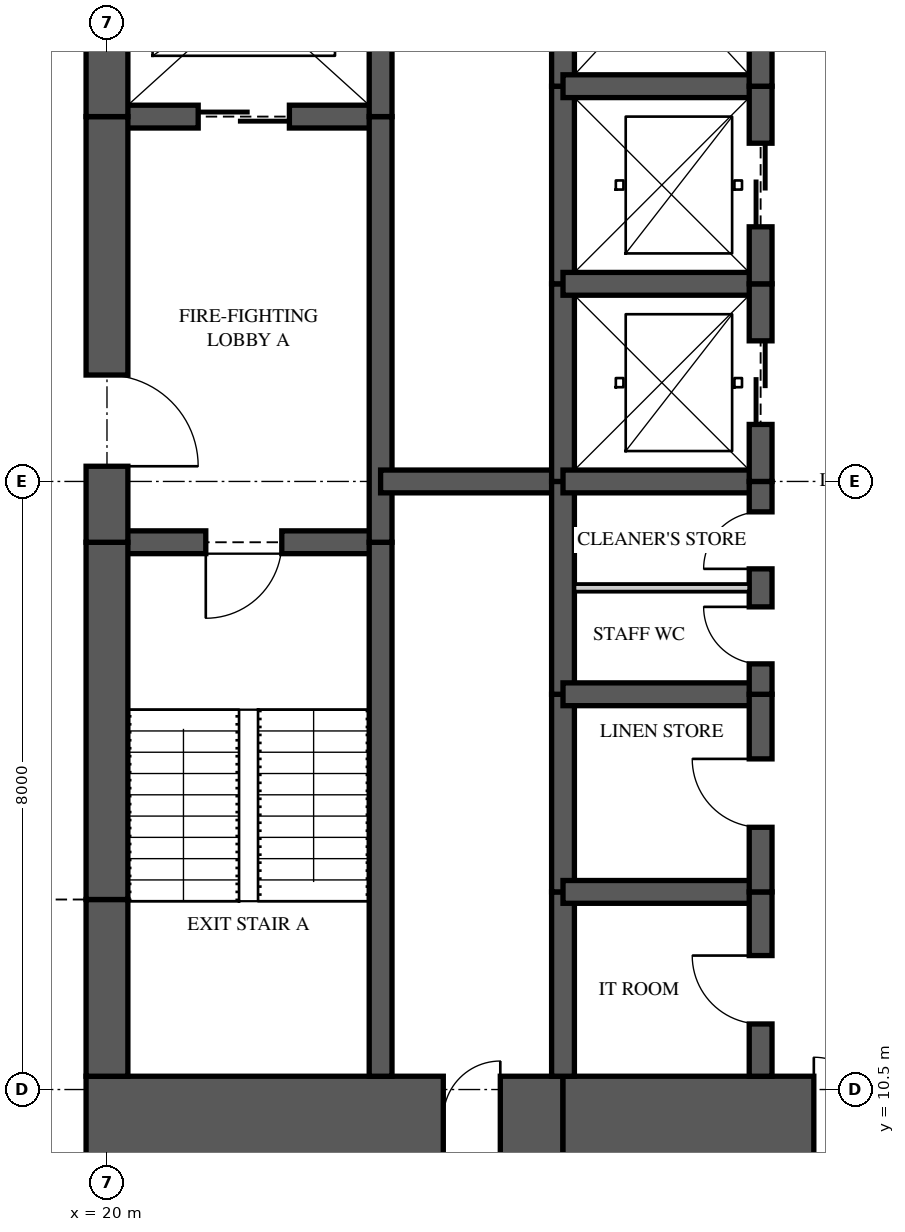
"""IFC4 building model, lengths in metres.
Left out: names, types, materials, properties, quantities, classifications, styles, units other than length and angle.
Written with IfcOpenShell. Run it as: python <this file> out.ifc"""

import sys

from ifc_helpers import new_model, si_unit, direction, frame, frame_2d, origin, place, context, subcontext, project, spatial, rectangle, extrude, element, fill, save


model = new_model("IFC4")
c1 = context("Model", 3, precision=1e-05, world=origin(), true_north=direction((0.0, 1.0)))
c2 = subcontext(c1, "Body", "Model", "MODEL_VIEW")
j1 = project(units=[si_unit("LENGTHUNIT", "METRE"), si_unit("PLANEANGLEUNIT", "RADIAN")], contexts=[c1])
p1 = place(None, origin())
s1 = spatial("IfcSite", under=j1, at=p1, CompositionType="ELEMENT")
p2 = place(p1, origin())
s2 = spatial("IfcBuilding", under=s1, at=p2, CompositionType="ELEMENT")
p3 = place(p2, frame((0.0, 0.0, 231.95)))
s3 = spatial("IfcBuildingStorey", under=s2, at=p3, CompositionType="ELEMENT", Elevation=231.95)
p4 = place(p3, frame((19.725, 10.125, 0.0), z_axis=(0.0, 0.0, 1.0), x_axis=(1.0, 0.0, 0.0)))
e1 = element("IfcWall", 1, at=p4, inside=s3, PredefinedType="SHEAR", context=c2, shape_type="SweptSolid", body=[
    extrude(rectangle(XDim=6.275, YDim=1.1, at=frame_2d((3.137, 0.0))), origin(), (0.0, 0.0, 1.0), 3.5),
])
p5 = place(p4, frame((4.7, 0.0, 0.0)))
e2 = element("IfcOpeningElement", 2, at=p5, cuts=e1, PredefinedType="OPENING", context=c2, shape_type="SweptSolid", body=[
    extrude(rectangle(XDim=0.75, YDim=2.1, at=frame_2d((0.375, 1.05))), frame((0.0, 0.56, 0.0), z_axis=(0.0, -1.0, 0.0), x_axis=(1.0, 0.0, 0.0)), (0.0, 0.0, 1.0), 1.12),
])
p6 = place(p3, frame((26.0, 10.125, 0.0), z_axis=(0.0, 0.0, 1.0), x_axis=(1.0, 0.0, 0.0)))
e3 = element("IfcWall", 3, at=p6, inside=s3, PredefinedType="SHEAR", context=c2, shape_type="SweptSolid", body=[
    extrude(rectangle(XDim=5.6, YDim=1.1, at=frame_2d((2.8, 0.0))), origin(), (0.0, 0.0, 1.0), 3.5),
])
p7 = place(p6, frame((3.3, 0.0, 0.0)))
e4 = element("IfcOpeningElement", 4, at=p7, cuts=e3, PredefinedType="OPENING", context=c2, shape_type="SweptSolid", body=[
    extrude(rectangle(XDim=1.6, YDim=2.1, at=frame_2d((0.8, 1.05))), frame((0.0, 0.56, 0.0), z_axis=(0.0, -1.0, 0.0), x_axis=(1.0, 0.0, 0.0)), (0.0, 0.0, 1.0), 1.12),
])
p8 = place(p3, frame((20.0, 26.325, 0.0), z_axis=(0.0, 0.0, 1.0), x_axis=(0.0, -1.0, 0.0)))
e5 = element("IfcWall", 5, at=p8, inside=s3, PredefinedType="SHEAR", context=c2, shape_type="SweptSolid", body=[
    extrude(rectangle(XDim=3.025, YDim=0.55, at=frame_2d((1.512, 0.0))), origin(), (0.0, 0.0, 1.0), 3.5),
])
p9 = place(p3, frame((20.0, 23.3, 0.0), z_axis=(0.0, 0.0, 1.0), x_axis=(0.0, -1.0, 0.0)))
e6 = element("IfcWall", 6, at=p9, inside=s3, PredefinedType="SHEAR", context=c2, shape_type="SweptSolid", body=[
    extrude(rectangle(XDim=5.6, YDim=0.55, at=frame_2d((2.8, 0.0))), origin(), (0.0, 0.0, 1.0), 3.5),
])
p10 = place(p9, frame((3.4, 0.0, 0.0)))
e7 = element("IfcOpeningElement", 7, at=p10, cuts=e6, PredefinedType="OPENING", context=c2, shape_type="SweptSolid", body=[
    extrude(rectangle(XDim=1.2, YDim=2.2, at=frame_2d((0.6, 1.1))), frame((0.0, 0.285, 0.0), z_axis=(0.0, -1.0, 0.0), x_axis=(1.0, 0.0, 0.0)), (0.0, 0.0, 1.0), 0.57),
])
p11 = place(p3, frame((20.0, 17.7, 0.0), z_axis=(0.0, 0.0, 1.0), x_axis=(0.0, -1.0, 0.0)))
e8 = element("IfcWall", 8, at=p11, inside=s3, PredefinedType="SHEAR", context=c2, shape_type="SweptSolid", body=[
    extrude(rectangle(XDim=4.7, YDim=0.55, at=frame_2d((2.35, 0.0))), origin(), (0.0, 0.0, 1.0), 3.5),
])
p12 = place(p3, frame((20.0, 13.0, 0.0), z_axis=(0.0, 0.0, 1.0), x_axis=(0.0, -1.0, 0.0)))
e9 = element("IfcWall", 9, at=p12, inside=s3, PredefinedType="SHEAR", context=c2, shape_type="SweptSolid", body=[
    extrude(rectangle(XDim=2.325, YDim=0.55, at=frame_2d((1.163, 0.0))), origin(), (0.0, 0.0, 1.0), 3.5),
])
p13 = place(p3, frame((23.6, 10.675, 0.0), z_axis=(0.0, 0.0, 1.0), x_axis=(0.0, 1.0, 0.0)))
e10 = element("IfcWall", 10, at=p13, inside=s3, PredefinedType="SHEAR", context=c2, shape_type="SweptSolid", body=[
    extrude(rectangle(XDim=7.025, YDim=0.3, at=frame_2d((3.512, 0.0))), origin(), (0.0, 0.0, 1.0), 3.5),
])
p14 = place(p3, frame((23.6, 17.7, 0.0), z_axis=(0.0, 0.0, 1.0), x_axis=(0.0, 1.0, 0.0)))
e11 = element("IfcWall", 11, at=p14, inside=s3, PredefinedType="SHEAR", context=c2, shape_type="SweptSolid", body=[
    extrude(rectangle(XDim=5.6, YDim=0.3, at=frame_2d((2.8, 0.0))), origin(), (0.0, 0.0, 1.0), 3.5),
])
p15 = place(p3, frame((23.6, 23.3, 0.0), z_axis=(0.0, 0.0, 1.0), x_axis=(0.0, 1.0, 0.0)))
e12 = element("IfcWall", 12, at=p15, inside=s3, PredefinedType="SHEAR", context=c2, shape_type="SweptSolid", body=[
    extrude(rectangle(XDim=3.025, YDim=0.3, at=frame_2d((1.512, 0.0))), origin(), (0.0, 0.0, 1.0), 3.5),
])
p16 = place(p3, frame((26.0, 10.675, 0.0), z_axis=(0.0, 0.0, 1.0), x_axis=(0.0, 1.0, 0.0)))
e13 = element("IfcWall", 13, at=p16, inside=s3, PredefinedType="SHEAR", context=c2, shape_type="SweptSolid", body=[
    extrude(rectangle(XDim=2.425, YDim=0.3, at=frame_2d((1.212, 0.0))), origin(), (0.0, 0.0, 1.0), 3.5),
])
p17 = place(p3, frame((26.0, 13.1, 0.0), z_axis=(0.0, 0.0, 1.0), x_axis=(0.0, 1.0, 0.0)))
e14 = element("IfcWall", 14, at=p17, inside=s3, PredefinedType="SHEAR", context=c2, shape_type="SweptSolid", body=[
    extrude(rectangle(XDim=2.6, YDim=0.3, at=frame_2d((1.3, 0.0))), origin(), (0.0, 0.0, 1.0), 3.5),
])
p18 = place(p3, frame((26.0, 15.7, 0.0), z_axis=(0.0, 0.0, 1.0), x_axis=(0.0, 1.0, 0.0)))
e15 = element("IfcWall", 15, at=p18, inside=s3, PredefinedType="SHEAR", context=c2, shape_type="SweptSolid", body=[
    extrude(rectangle(XDim=2.8, YDim=0.3, at=frame_2d((1.4, 0.0))), origin(), (0.0, 0.0, 1.0), 3.5),
])
p19 = place(p3, frame((26.0, 18.5, 0.0), z_axis=(0.0, 0.0, 1.0), x_axis=(0.0, 1.0, 0.0)))
e16 = element("IfcWall", 16, at=p19, inside=s3, PredefinedType="SHEAR", context=c2, shape_type="SweptSolid", body=[
    extrude(rectangle(XDim=2.6, YDim=0.3, at=frame_2d((1.3, 0.0))), origin(), (0.0, 0.0, 1.0), 3.5),
])
p20 = place(p3, frame((26.0, 21.1, 0.0), z_axis=(0.0, 0.0, 1.0), x_axis=(0.0, 1.0, 0.0)))
e17 = element("IfcWall", 17, at=p20, inside=s3, PredefinedType="SHEAR", context=c2, shape_type="SweptSolid", body=[
    extrude(rectangle(XDim=2.6, YDim=0.3, at=frame_2d((1.3, 0.0))), origin(), (0.0, 0.0, 1.0), 3.5),
])
p21 = place(p3, frame((26.0, 23.7, 0.0), z_axis=(0.0, 0.0, 1.0), x_axis=(0.0, 1.0, 0.0)))
e18 = element("IfcWall", 18, at=p21, inside=s3, PredefinedType="SHEAR", context=c2, shape_type="SweptSolid", body=[
    extrude(rectangle(XDim=2.625, YDim=0.3, at=frame_2d((1.312, 0.0))), origin(), (0.0, 0.0, 1.0), 3.5),
])
p22 = place(p3, frame((28.6, 10.675, 0.0), z_axis=(0.0, 0.0, 1.0), x_axis=(0.0, 1.0, 0.0)))
e19 = element("IfcWall", 19, at=p22, inside=s3, PredefinedType="SHEAR", context=c2, shape_type="SweptSolid", body=[
    extrude(rectangle(XDim=2.425, YDim=0.3, at=frame_2d((1.212, 0.0))), origin(), (0.0, 0.0, 1.0), 3.5),
])
p23 = place(p22, frame((0.688, 0.0, 0.0)))
e20 = element("IfcOpeningElement", 20, at=p23, cuts=e19, PredefinedType="OPENING", context=c2, shape_type="SweptSolid", body=[
    extrude(rectangle(XDim=0.9, YDim=2.1, at=frame_2d((0.45, 1.05))), frame((0.0, 0.16, 0.0), z_axis=(0.0, -1.0, 0.0), x_axis=(1.0, 0.0, 0.0)), (0.0, 0.0, 1.0), 0.32),
])
p24 = place(p3, frame((28.6, 13.1, 0.0), z_axis=(0.0, 0.0, 1.0), x_axis=(0.0, 1.0, 0.0)))
e21 = element("IfcWall", 21, at=p24, inside=s3, PredefinedType="SHEAR", context=c2, shape_type="SweptSolid", body=[
    extrude(rectangle(XDim=2.6, YDim=0.3, at=frame_2d((1.3, 0.0))), origin(), (0.0, 0.0, 1.0), 3.5),
])
p25 = place(p24, frame((0.85, 0.0, 0.0)))
e22 = element("IfcOpeningElement", 22, at=p25, cuts=e21, PredefinedType="OPENING", context=c2, shape_type="SweptSolid", body=[
    extrude(rectangle(XDim=0.9, YDim=2.1, at=frame_2d((0.45, 1.05))), frame((0.0, 0.16, 0.0), z_axis=(0.0, -1.0, 0.0), x_axis=(1.0, 0.0, 0.0)), (0.0, 0.0, 1.0), 0.32),
])
p26 = place(p3, frame((28.6, 15.7, 0.0), z_axis=(0.0, 0.0, 1.0), x_axis=(0.0, 1.0, 0.0)))
e23 = element("IfcWall", 23, at=p26, inside=s3, PredefinedType="SHEAR", context=c2, shape_type="SweptSolid", body=[
    extrude(rectangle(XDim=2.8, YDim=0.3, at=frame_2d((1.4, 0.0))), origin(), (0.0, 0.0, 1.0), 3.5),
])
p27 = place(p26, frame((0.4, 0.0, 0.0)))
e24 = element("IfcOpeningElement", 24, at=p27, cuts=e23, PredefinedType="OPENING", context=c2, shape_type="SweptSolid", body=[
    extrude(rectangle(XDim=0.75, YDim=2.1, at=frame_2d((0.375, 1.05))), frame((0.0, 0.16, 0.0), z_axis=(0.0, -1.0, 0.0), x_axis=(1.0, 0.0, 0.0)), (0.0, 0.0, 1.0), 0.32),
])
p28 = place(p26, frame((1.65, 0.0, 0.0)))
e25 = element("IfcOpeningElement", 25, at=p28, cuts=e23, PredefinedType="OPENING", context=c2, shape_type="SweptSolid", body=[
    extrude(rectangle(XDim=0.75, YDim=2.1, at=frame_2d((0.375, 1.05))), frame((0.0, 0.16, 0.0), z_axis=(0.0, -1.0, 0.0), x_axis=(1.0, 0.0, 0.0)), (0.0, 0.0, 1.0), 0.32),
])
p29 = place(p3, frame((28.6, 18.5, 0.0), z_axis=(0.0, 0.0, 1.0), x_axis=(0.0, 1.0, 0.0)))
e26 = element("IfcWall", 26, at=p29, inside=s3, PredefinedType="SHEAR", context=c2, shape_type="SweptSolid", body=[
    extrude(rectangle(XDim=2.6, YDim=0.3, at=frame_2d((1.3, 0.0))), origin(), (0.0, 0.0, 1.0), 3.5),
])
p30 = place(p29, frame((0.75, 0.0, 0.0)))
e27 = element("IfcOpeningElement", 27, at=p30, cuts=e26, PredefinedType="OPENING", context=c2, shape_type="SweptSolid", body=[
    extrude(rectangle(XDim=1.1, YDim=2.1, at=frame_2d((0.55, 1.05))), frame((0.0, 0.16, 0.0), z_axis=(0.0, -1.0, 0.0), x_axis=(1.0, 0.0, 0.0)), (0.0, 0.0, 1.0), 0.32),
])
p31 = place(p3, frame((28.6, 21.1, 0.0), z_axis=(0.0, 0.0, 1.0), x_axis=(0.0, 1.0, 0.0)))
e28 = element("IfcWall", 28, at=p31, inside=s3, PredefinedType="SHEAR", context=c2, shape_type="SweptSolid", body=[
    extrude(rectangle(XDim=2.6, YDim=0.3, at=frame_2d((1.3, 0.0))), origin(), (0.0, 0.0, 1.0), 3.5),
])
p32 = place(p31, frame((0.75, 0.0, 0.0)))
e29 = element("IfcOpeningElement", 29, at=p32, cuts=e28, PredefinedType="OPENING", context=c2, shape_type="SweptSolid", body=[
    extrude(rectangle(XDim=1.1, YDim=2.1, at=frame_2d((0.55, 1.05))), frame((0.0, 0.16, 0.0), z_axis=(0.0, -1.0, 0.0), x_axis=(1.0, 0.0, 0.0)), (0.0, 0.0, 1.0), 0.32),
])
p33 = place(p3, frame((28.6, 23.7, 0.0), z_axis=(0.0, 0.0, 1.0), x_axis=(0.0, 1.0, 0.0)))
e30 = element("IfcWall", 30, at=p33, inside=s3, PredefinedType="SHEAR", context=c2, shape_type="SweptSolid", body=[
    extrude(rectangle(XDim=2.625, YDim=0.3, at=frame_2d((1.312, 0.0))), origin(), (0.0, 0.0, 1.0), 3.5),
])
p34 = place(p33, frame((0.85, 0.0, 0.0)))
e31 = element("IfcOpeningElement", 31, at=p34, cuts=e30, PredefinedType="OPENING", context=c2, shape_type="SweptSolid", body=[
    extrude(rectangle(XDim=1.1, YDim=2.1, at=frame_2d((0.55, 1.05))), frame((0.0, 0.16, 0.0), z_axis=(0.0, -1.0, 0.0), x_axis=(1.0, 0.0, 0.0)), (0.0, 0.0, 1.0), 0.32),
])
p35 = place(p3, frame((20.0, 17.7, 0.0), z_axis=(0.0, 0.0, 1.0), x_axis=(1.0, 0.0, 0.0)))
e32 = element("IfcWall", 32, at=p35, inside=s3, PredefinedType="SHEAR", context=c2, shape_type="SweptSolid", body=[
    extrude(rectangle(XDim=3.6, YDim=0.3, at=frame_2d((1.8, 0.0))), origin(), (0.0, 0.0, 1.0), 3.5),
])
p36 = place(p35, frame((1.3, 0.0, 0.0)))
e33 = element("IfcOpeningElement", 33, at=p36, cuts=e32, PredefinedType="OPENING", context=c2, shape_type="SweptSolid", body=[
    extrude(rectangle(XDim=1.0, YDim=2.1, at=frame_2d((0.5, 1.05))), frame((0.0, 0.16, 0.0), z_axis=(0.0, -1.0, 0.0), x_axis=(1.0, 0.0, 0.0)), (0.0, 0.0, 1.0), 0.32),
])
p37 = place(p3, frame((20.0, 23.3, 0.0), z_axis=(0.0, 0.0, 1.0), x_axis=(1.0, 0.0, 0.0)))
e34 = element("IfcWall", 34, at=p37, inside=s3, PredefinedType="SHEAR", context=c2, shape_type="SweptSolid", body=[
    extrude(rectangle(XDim=3.6, YDim=0.3, at=frame_2d((1.8, 0.0))), origin(), (0.0, 0.0, 1.0), 3.5),
])
p38 = place(p37, frame((1.2, 0.0, 0.0)))
e35 = element("IfcOpeningElement", 35, at=p38, cuts=e34, PredefinedType="OPENING", context=c2, shape_type="SweptSolid", body=[
    extrude(rectangle(XDim=1.2, YDim=2.1, at=frame_2d((0.6, 1.05))), frame((0.0, 0.16, 0.0), z_axis=(0.0, -1.0, 0.0), x_axis=(1.0, 0.0, 0.0)), (0.0, 0.0, 1.0), 0.32),
])
p39 = place(p3, frame((23.6, 18.5, 0.0), z_axis=(0.0, 0.0, 1.0), x_axis=(1.0, 0.0, 0.0)))
e36 = element("IfcWall", 36, at=p39, inside=s3, PredefinedType="SHEAR", context=c2, shape_type="SweptSolid", body=[
    extrude(rectangle(XDim=2.4, YDim=0.3, at=frame_2d((1.2, 0.0))), origin(), (0.0, 0.0, 1.0), 3.5),
])
for number, where, z_axis, x_axis in (
    (37, (26.0, 13.1, 0.0), (0.0, 0.0, 1.0), (1.0, 0.0, 0.0)),
    (38, (26.0, 15.7, 0.0), (0.0, 0.0, 1.0), (1.0, 0.0, 0.0)),
    (39, (26.0, 18.5, 0.0), (0.0, 0.0, 1.0), (1.0, 0.0, 0.0)),
    (40, (26.0, 21.1, 0.0), (0.0, 0.0, 1.0), (1.0, 0.0, 0.0)),
    (41, (26.0, 23.7, 0.0), (0.0, 0.0, 1.0), (1.0, 0.0, 0.0)),
):
    element("IfcWall", number, at=place(p3, frame(where, z_axis=z_axis, x_axis=x_axis)), inside=s3, PredefinedType="SHEAR", context=c2, shape_type="SweptSolid", body=[
        extrude(rectangle(XDim=2.6, YDim=0.3, at=frame_2d((1.3, 0.0))), origin(), (0.0, 0.0, 1.0), 3.5),
    ])
p40 = place(p3, frame((26.15, 17.1, 0.0), z_axis=(0.0, 0.0, 1.0), x_axis=(1.0, 0.0, 0.0)))
e42 = element("IfcWall", 42, at=p40, inside=s3, PredefinedType="PARTITIONING", context=c2, shape_type="SweptSolid", body=[
    extrude(rectangle(XDim=2.3, YDim=0.1, at=frame_2d((1.15, 0.0))), origin(), (0.0, 0.0, 1.0), 3.26),
])
p41 = place(p36, frame((1.0, 0.0, 0.0), z_axis=(0.0, 0.0, 1.0), x_axis=(-1.0, 0.0, 0.0)))
e43 = element("IfcDoor", 43, at=p41, inside=s3, OperationType="SINGLE_SWING_RIGHT", PredefinedType="DOOR", context=c2, shape_type="SweptSolid", body=[
    extrude(rectangle(XDim=1.0, YDim=2.1, at=frame_2d((0.5, 1.05))), frame((0.0, 0.025, 0.0), z_axis=(0.0, -1.0, 0.0), x_axis=(1.0, 0.0, 0.0)), (0.0, 0.0, 1.0), 0.05),
])
fill(e33, e43)
p42 = place(p10, origin())
e44 = element("IfcDoor", 44, at=p42, inside=s3, OperationType="SINGLE_SWING_RIGHT", PredefinedType="DOOR", context=c2, shape_type="SweptSolid", body=[
    extrude(rectangle(XDim=1.2, YDim=2.2, at=frame_2d((0.6, 1.1))), frame((0.0, 0.025, 0.0), z_axis=(0.0, -1.0, 0.0), x_axis=(1.0, 0.0, 0.0)), (0.0, 0.0, 1.0), 0.05),
])
fill(e7, e44)
p43 = place(p38, origin())
e45 = element("IfcDoor", 45, at=p43, inside=s3, OperationType="SLIDING_TO_LEFT", PredefinedType="DOOR", context=c2, shape_type="SweptSolid", body=[
    extrude(rectangle(XDim=1.2, YDim=2.1, at=frame_2d((0.6, 1.05))), frame((0.0, 0.025, 0.0), z_axis=(0.0, -1.0, 0.0), x_axis=(1.0, 0.0, 0.0)), (0.0, 0.0, 1.0), 0.05),
])
fill(e35, e45)
p44 = place(p30, origin())
e46 = element("IfcDoor", 46, at=p44, inside=s3, OperationType="SLIDING_TO_LEFT", PredefinedType="DOOR", context=c2, shape_type="SweptSolid", body=[
    extrude(rectangle(XDim=1.1, YDim=2.1, at=frame_2d((0.55, 1.05))), frame((0.0, 0.025, 0.0), z_axis=(0.0, -1.0, 0.0), x_axis=(1.0, 0.0, 0.0)), (0.0, 0.0, 1.0), 0.05),
])
fill(e27, e46)
p45 = place(p32, origin())
e47 = element("IfcDoor", 47, at=p45, inside=s3, OperationType="SLIDING_TO_LEFT", PredefinedType="DOOR", context=c2, shape_type="SweptSolid", body=[
    extrude(rectangle(XDim=1.1, YDim=2.1, at=frame_2d((0.55, 1.05))), frame((0.0, 0.025, 0.0), z_axis=(0.0, -1.0, 0.0), x_axis=(1.0, 0.0, 0.0)), (0.0, 0.0, 1.0), 0.05),
])
fill(e29, e47)
p46 = place(p23, origin())
e48 = element("IfcDoor", 48, at=p46, inside=s3, OperationType="SINGLE_SWING_RIGHT", PredefinedType="DOOR", context=c2, shape_type="SweptSolid", body=[
    extrude(rectangle(XDim=0.9, YDim=2.1, at=frame_2d((0.45, 1.05))), frame((0.0, 0.025, 0.0), z_axis=(0.0, -1.0, 0.0), x_axis=(1.0, 0.0, 0.0)), (0.0, 0.0, 1.0), 0.05),
])
fill(e20, e48)
p47 = place(p25, origin())
e49 = element("IfcDoor", 49, at=p47, inside=s3, OperationType="SINGLE_SWING_RIGHT", PredefinedType="DOOR", context=c2, shape_type="SweptSolid", body=[
    extrude(rectangle(XDim=0.9, YDim=2.1, at=frame_2d((0.45, 1.05))), frame((0.0, 0.025, 0.0), z_axis=(0.0, -1.0, 0.0), x_axis=(1.0, 0.0, 0.0)), (0.0, 0.0, 1.0), 0.05),
])
fill(e22, e49)
p48 = place(p27, origin())
e50 = element("IfcDoor", 50, at=p48, inside=s3, OperationType="SINGLE_SWING_RIGHT", PredefinedType="DOOR", context=c2, shape_type="SweptSolid", body=[
    extrude(rectangle(XDim=0.75, YDim=2.1, at=frame_2d((0.375, 1.05))), frame((0.0, 0.025, 0.0), z_axis=(0.0, -1.0, 0.0), x_axis=(1.0, 0.0, 0.0)), (0.0, 0.0, 1.0), 0.05),
])
fill(e24, e50)
p49 = place(p28, origin())
e51 = element("IfcDoor", 51, at=p49, inside=s3, OperationType="SINGLE_SWING_LEFT", PredefinedType="DOOR", context=c2, shape_type="SweptSolid", body=[
    extrude(rectangle(XDim=0.75, YDim=2.1, at=frame_2d((0.375, 1.05))), frame((0.0, 0.025, 0.0), z_axis=(0.0, -1.0, 0.0), x_axis=(1.0, 0.0, 0.0)), (0.0, 0.0, 1.0), 0.05),
])
fill(e25, e51)
p50 = place(p7, origin())
e52 = element("IfcDoor", 52, at=p50, inside=s3, OperationType="DOUBLE_DOOR_SINGLE_SWING", PredefinedType="DOOR", context=c2, shape_type="SweptSolid", body=[
    extrude(rectangle(XDim=1.6, YDim=2.1, at=frame_2d((0.8, 1.05))), frame((0.0, 0.025, 0.0), z_axis=(0.0, -1.0, 0.0), x_axis=(1.0, 0.0, 0.0)), (0.0, 0.0, 1.0), 0.05),
])
fill(e4, e52)
p51 = place(p5, origin())
e53 = element("IfcDoor", 53, at=p51, inside=s3, OperationType="SINGLE_SWING_RIGHT", PredefinedType="DOOR", context=c2, shape_type="SweptSolid", body=[
    extrude(rectangle(XDim=0.75, YDim=2.1, at=frame_2d((0.375, 1.05))), frame((0.0, 0.025, 0.0), z_axis=(0.0, -1.0, 0.0), x_axis=(1.0, 0.0, 0.0)), (0.0, 0.0, 1.0), 0.05),
])
fill(e2, e53)
save(model, sys.argv[1])
